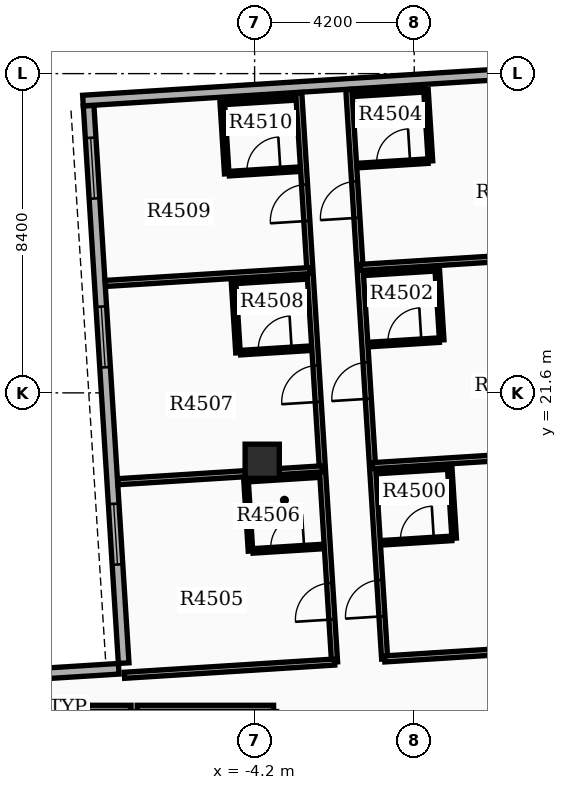
"""IFC4 building model, lengths in metres.
Left out: names, types, materials, properties, quantities, classifications, styles, units other than length and angle.
Written with IfcOpenShell. Run it as: python <this file> out.ifc"""

import sys

from ifc_helpers import new_model, si_unit, direction, frame, frame_2d, origin, origin_2d, place, context, subcontext, project, spatial, rectangle, circle, extrude, element, fill, save


model = new_model("IFC4")
c1 = context("Model", 3, precision=1e-05, world=origin(), true_north=direction((0.0, 1.0)))
c2 = subcontext(c1, "Body", "Model", "MODEL_VIEW")
j1 = project(units=[si_unit("LENGTHUNIT", "METRE"), si_unit("PLANEANGLEUNIT", "RADIAN")], contexts=[c1])
p1 = place(None, origin())
s1 = spatial("IfcSite", under=j1, at=p1, CompositionType="ELEMENT")
p2 = place(p1, origin())
s2 = spatial("IfcBuilding", under=s1, at=p2, CompositionType="ELEMENT")
p3 = place(p2, frame((0.0, 0.0, 281.1)))
s3 = spatial("IfcBuildingStorey", under=s2, at=p3, CompositionType="ELEMENT", Elevation=281.1)
p4 = place(p3, frame((-4.0, 19.8, 0.0), z_axis=(0.0, 0.0, 1.0), x_axis=(1.0, 0.0, 0.0)))
e1 = element("IfcColumn", 1, at=p4, inside=s3, PredefinedType="COLUMN", context=c2, shape_type="SweptSolid", body=[
    extrude(circle(Radius=0.45, at=origin_2d()), origin(), (0.0, 0.0, 1.0), 3.9),
])
p5 = place(p3, frame((-8.568, 29.16, 0.0), z_axis=(0.0, 0.0, 1.0), x_axis=(0.062794967833, -0.998026448555, 0.0)))
e2 = element("IfcWall", 2, at=p5, inside=s3, PredefinedType="STANDARD", context=c2, shape_type="SweptSolid", body=[
    extrude(rectangle(XDim=14.7, YDim=0.28, at=frame_2d((7.35, 0.0))), origin(), (0.0, 0.0, 1.0), 3.18),
])
p6 = place(p5, frame((0.85, 0.0, 0.8)))
e3 = element("IfcOpeningElement", 3, at=p6, cuts=e2, PredefinedType="OPENING", context=c2, shape_type="SweptSolid", body=[
    extrude(rectangle(XDim=1.6, YDim=1.7, at=frame_2d((0.8, 0.85))), frame((0.0, 0.15, 0.0), z_axis=(0.0, -1.0, 0.0), x_axis=(1.0, 0.0, 0.0)), (0.0, 0.0, 1.0), 0.3),
])
p7 = place(p5, frame((5.3, 0.0, 0.8)))
e4 = element("IfcOpeningElement", 4, at=p7, cuts=e2, PredefinedType="OPENING", context=c2, shape_type="SweptSolid", body=[
    extrude(rectangle(XDim=1.6, YDim=1.7, at=frame_2d((0.8, 0.85))), frame((0.0, 0.15, 0.0), z_axis=(0.0, -1.0, 0.0), x_axis=(1.0, 0.0, 0.0)), (0.0, 0.0, 1.0), 0.3),
])
p8 = place(p5, frame((10.5, 0.0, 0.8)))
e5 = element("IfcOpeningElement", 5, at=p8, cuts=e2, PredefinedType="OPENING", context=c2, shape_type="SweptSolid", body=[
    extrude(rectangle(XDim=1.6, YDim=1.7, at=frame_2d((0.8, 0.85))), frame((0.0, 0.15, 0.0), z_axis=(0.0, -1.0, 0.0), x_axis=(1.0, 0.0, 0.0)), (0.0, 0.0, 1.0), 0.3),
])
p9 = place(p3, frame((4.977, 30.152, 0.0), z_axis=(0.0, 0.0, 1.0), x_axis=(-0.998026318072, -0.062797041623, 0.0)))
e6 = element("IfcWall", 6, at=p9, inside=s3, PredefinedType="STANDARD", context=c2, shape_type="SweptSolid", body=[
    extrude(rectangle(XDim=13.72, YDim=0.28, at=frame_2d((6.86, 0.0))), origin(), (0.0, 0.0, 1.0), 3.18),
])
p10 = place(p9, frame((0.85, 0.0, 0.85)))
e7 = element("IfcOpeningElement", 7, at=p10, cuts=e6, PredefinedType="OPENING", context=c2, shape_type="SweptSolid", body=[
    extrude(rectangle(XDim=1.0, YDim=1.5, at=frame_2d((0.5, 0.75))), frame((0.0, 0.15, 0.0), z_axis=(0.0, -1.0, 0.0), x_axis=(1.0, 0.0, 0.0)), (0.0, 0.0, 1.0), 0.3),
])
p11 = place(p3, frame((-14.063, 13.945, 0.0), z_axis=(0.0, 0.0, 1.0), x_axis=(0.998027314704, 0.062781200242, 0.0)))
e8 = element("IfcWall", 8, at=p11, inside=s3, PredefinedType="STANDARD", context=c2, shape_type="SweptSolid", body=[
    extrude(rectangle(XDim=6.3, YDim=0.28, at=frame_2d((3.15, 0.0))), origin(), (0.0, 0.0, 1.0), 3.18),
])
p12 = place(p3, frame((-11.0, 13.3, 0.0), z_axis=(0.0, 0.0, 1.0), x_axis=(1.0, 0.0, 0.0)))
e9 = element("IfcWall", 9, at=p12, inside=s3, PredefinedType="PARTITIONING", context=c2, shape_type="SweptSolid", body=[
    extrude(rectangle(XDim=3.55, YDim=0.16, at=frame_2d((1.775, 0.0))), origin(), (0.0, 0.0, 1.0), 3.17),
])
p13 = place(p3, frame((-7.29, 13.3, 0.0), z_axis=(0.0, 0.0, 1.0), x_axis=(1.0, 0.0, 0.0)))
e10 = element("IfcWall", 10, at=p13, inside=s3, PredefinedType="PARTITIONING", context=c2, shape_type="SweptSolid", body=[
    extrude(rectangle(XDim=3.59, YDim=0.16, at=frame_2d((1.795, 0.0))), origin(), (0.0, 0.0, 1.0), 3.17),
])
p14 = place(p3, frame((-0.778, 14.6, 0.0), z_axis=(0.0, 0.0, 1.0), x_axis=(-0.062791373209, 0.998026674719, 0.0)))
e11 = element("IfcWall", 11, at=p14, inside=s3, PredefinedType="PARTITIONING", context=c2, shape_type="SweptSolid", body=[
    extrude(rectangle(XDim=15.012, YDim=0.16, at=frame_2d((7.506, 0.0))), origin(), (0.0, 0.0, 1.0), 3.17),
])
p15 = place(p14, frame((1.122, 0.0, 0.0)))
e12 = element("IfcOpeningElement", 12, at=p15, cuts=e11, PredefinedType="OPENING", context=c2, shape_type="SweptSolid", body=[
    extrude(rectangle(XDim=0.96, YDim=2.15, at=frame_2d((0.48, 1.075))), frame((0.0, 0.09, 0.0), z_axis=(0.0, -1.0, 0.0), x_axis=(1.0, 0.0, 0.0)), (0.0, 0.0, 1.0), 0.18),
])
p16 = place(p14, frame((6.858, 0.0, 0.0)))
e13 = element("IfcOpeningElement", 13, at=p16, cuts=e11, PredefinedType="OPENING", context=c2, shape_type="SweptSolid", body=[
    extrude(rectangle(XDim=0.96, YDim=2.15, at=frame_2d((0.48, 1.075))), frame((0.0, 0.09, 0.0), z_axis=(0.0, -1.0, 0.0), x_axis=(1.0, 0.0, 0.0)), (0.0, 0.0, 1.0), 0.18),
])
p17 = place(p14, frame((11.628, 0.0, 0.0)))
e14 = element("IfcOpeningElement", 14, at=p17, cuts=e11, PredefinedType="OPENING", context=c2, shape_type="SweptSolid", body=[
    extrude(rectangle(XDim=0.96, YDim=2.15, at=frame_2d((0.48, 1.075))), frame((0.0, 0.09, 0.0), z_axis=(0.0, -1.0, 0.0), x_axis=(1.0, 0.0, 0.0)), (0.0, 0.0, 1.0), 0.18),
])
p18 = place(p3, frame((-0.778, 14.6, 0.0), z_axis=(0.0, 0.0, 1.0), x_axis=(0.998025197366, 0.062814850334, 0.0)))
e15 = element("IfcWall", 15, at=p18, inside=s3, PredefinedType="PARTITIONING", context=c2, shape_type="SweptSolid", body=[
    extrude(rectangle(XDim=6.58, YDim=0.16, at=frame_2d((3.29, 0.0))), origin(), (0.0, 0.0, 1.0), 3.17),
])
p19 = place(p3, frame((-1.098, 19.684, 0.0), z_axis=(0.0, 0.0, 1.0), x_axis=(0.998024861541, 0.062820185823, 0.0)))
e16 = element("IfcWall", 16, at=p19, inside=s3, PredefinedType="PARTITIONING", context=c2, shape_type="SweptSolid", body=[
    extrude(rectangle(XDim=6.432, YDim=0.16, at=frame_2d((3.216, 0.0))), origin(), (0.0, 0.0, 1.0), 3.17),
])
p20 = place(p3, frame((-0.83, 17.657, 0.0), z_axis=(0.0, 0.0, 1.0), x_axis=(0.998027443946, 0.062779145668, 0.0)))
e17 = element("IfcWall", 17, at=p20, inside=s3, PredefinedType="PARTITIONING", context=c2, shape_type="SweptSolid", body=[
    extrude(rectangle(XDim=1.82, YDim=0.12, at=frame_2d((0.91, 0.0))), origin(), (0.0, 0.0, 1.0), 3.17),
])
p21 = place(p20, frame((0.47, 0.0, 0.0)))
e18 = element("IfcOpeningElement", 18, at=p21, cuts=e17, PredefinedType="OPENING", context=c2, shape_type="SweptSolid", body=[
    extrude(rectangle(XDim=0.88, YDim=2.1, at=frame_2d((0.44, 1.05))), frame((0.0, 0.07, 0.0), z_axis=(0.0, -1.0, 0.0), x_axis=(1.0, 0.0, 0.0)), (0.0, 0.0, 1.0), 0.14),
])
p22 = place(p3, frame((-0.948, 19.533, 0.0), z_axis=(0.0, 0.0, 1.0), x_axis=(0.998027972529, 0.062770741989, 0.0)))
e19 = element("IfcWall", 19, at=p22, inside=s3, PredefinedType="PARTITIONING", context=c2, shape_type="SweptSolid", body=[
    extrude(rectangle(XDim=1.82, YDim=0.12, at=frame_2d((0.91, 0.0))), origin(), (0.0, 0.0, 1.0), 3.17),
])
p23 = place(p3, frame((1.051, 17.775, 0.0), z_axis=(0.0, 0.0, 1.0), x_axis=(-0.062855297722, 0.998022650819, 0.0)))
e20 = element("IfcWall", 20, at=p23, inside=s3, PredefinedType="PARTITIONING", context=c2, shape_type="SweptSolid", body=[
    extrude(rectangle(XDim=1.88, YDim=0.12, at=frame_2d((0.94, 0.0))), origin(), (0.0, 0.0, 1.0), 3.17),
])
p24 = place(p3, frame((-1.426, 24.901, 0.0), z_axis=(0.0, 0.0, 1.0), x_axis=(0.998027240637, 0.062782377668, 0.0)))
e21 = element("IfcWall", 21, at=p24, inside=s3, PredefinedType="PARTITIONING", context=c2, shape_type="SweptSolid", body=[
    extrude(rectangle(XDim=6.432, YDim=0.16, at=frame_2d((3.216, 0.0))), origin(), (0.0, 0.0, 1.0), 3.17),
])
p25 = place(p3, frame((-1.158, 22.873, 0.0), z_axis=(0.0, 0.0, 1.0), x_axis=(0.998019030272, 0.062912758763, 0.0)))
e22 = element("IfcWall", 22, at=p25, inside=s3, PredefinedType="PARTITIONING", context=c2, shape_type="SweptSolid", body=[
    extrude(rectangle(XDim=1.82, YDim=0.12, at=frame_2d((0.91, 0.0))), origin(), (0.0, 0.0, 1.0), 3.17),
])
p26 = place(p25, frame((0.47, 0.0, 0.0)))
e23 = element("IfcOpeningElement", 23, at=p26, cuts=e22, PredefinedType="OPENING", context=c2, shape_type="SweptSolid", body=[
    extrude(rectangle(XDim=0.88, YDim=2.1, at=frame_2d((0.44, 1.05))), frame((0.0, 0.07, 0.0), z_axis=(0.0, -1.0, 0.0), x_axis=(1.0, 0.0, 0.0)), (0.0, 0.0, 1.0), 0.14),
])
p27 = place(p3, frame((-1.277, 24.75, 0.0), z_axis=(0.0, 0.0, 1.0), x_axis=(0.998027443946, 0.062779145668, 0.0)))
e24 = element("IfcWall", 24, at=p27, inside=s3, PredefinedType="PARTITIONING", context=c2, shape_type="SweptSolid", body=[
    extrude(rectangle(XDim=1.82, YDim=0.12, at=frame_2d((0.91, 0.0))), origin(), (0.0, 0.0, 1.0), 3.17),
])
p28 = place(p3, frame((0.723, 22.992, 0.0), z_axis=(0.0, 0.0, 1.0), x_axis=(-0.062855297722, 0.998022650819, 0.0)))
e25 = element("IfcWall", 25, at=p28, inside=s3, PredefinedType="PARTITIONING", context=c2, shape_type="SweptSolid", body=[
    extrude(rectangle(XDim=1.88, YDim=0.12, at=frame_2d((0.94, 0.0))), origin(), (0.0, 0.0, 1.0), 3.17),
])
p29 = place(p3, frame((-1.455, 27.583, 0.0), z_axis=(0.0, 0.0, 1.0), x_axis=(0.998019030272, 0.062912758763, 0.0)))
e26 = element("IfcWall", 26, at=p29, inside=s3, PredefinedType="PARTITIONING", context=c2, shape_type="SweptSolid", body=[
    extrude(rectangle(XDim=1.82, YDim=0.12, at=frame_2d((0.91, 0.0))), origin(), (0.0, 0.0, 1.0), 3.17),
])
p30 = place(p29, frame((0.47, 0.0, 0.0)))
e27 = element("IfcOpeningElement", 27, at=p30, cuts=e26, PredefinedType="OPENING", context=c2, shape_type="SweptSolid", body=[
    extrude(rectangle(XDim=0.88, YDim=2.1, at=frame_2d((0.44, 1.05))), frame((0.0, 0.07, 0.0), z_axis=(0.0, -1.0, 0.0), x_axis=(1.0, 0.0, 0.0)), (0.0, 0.0, 1.0), 0.14),
])
p31 = place(p3, frame((-1.573, 29.459, 0.0), z_axis=(0.0, 0.0, 1.0), x_axis=(0.998035839873, 0.062645529196, 0.0)))
e28 = element("IfcWall", 28, at=p31, inside=s3, PredefinedType="PARTITIONING", context=c2, shape_type="SweptSolid", body=[
    extrude(rectangle(XDim=1.82, YDim=0.12, at=frame_2d((0.91, 0.0))), origin(), (0.0, 0.0, 1.0), 3.17),
])
p32 = place(p3, frame((0.427, 27.701, 0.0), z_axis=(0.0, 0.0, 1.0), x_axis=(-0.062855297722, 0.998022650819, 0.0)))
e29 = element("IfcWall", 29, at=p32, inside=s3, PredefinedType="PARTITIONING", context=c2, shape_type="SweptSolid", body=[
    extrude(rectangle(XDim=1.88, YDim=0.12, at=frame_2d((0.94, 0.0))), origin(), (0.0, 0.0, 1.0), 3.17),
])
p33 = place(p3, frame((-2.096, 14.517, 0.0), z_axis=(0.0, 0.0, 1.0), x_axis=(-0.062791373209, 0.998026674719, 0.0)))
e30 = element("IfcWall", 30, at=p33, inside=s3, PredefinedType="PARTITIONING", context=c2, shape_type="SweptSolid", body=[
    extrude(rectangle(XDim=15.012, YDim=0.16, at=frame_2d((7.506, 0.0))), origin(), (0.0, 0.0, 1.0), 3.17),
])
p34 = place(p33, frame((1.122, 0.0, 0.0)))
e31 = element("IfcOpeningElement", 31, at=p34, cuts=e30, PredefinedType="OPENING", context=c2, shape_type="SweptSolid", body=[
    extrude(rectangle(XDim=0.96, YDim=2.15, at=frame_2d((0.48, 1.075))), frame((0.0, 0.09, 0.0), z_axis=(0.0, -1.0, 0.0), x_axis=(1.0, 0.0, 0.0)), (0.0, 0.0, 1.0), 0.18),
])
p35 = place(p33, frame((6.858, 0.0, 0.0)))
e32 = element("IfcOpeningElement", 32, at=p35, cuts=e30, PredefinedType="OPENING", context=c2, shape_type="SweptSolid", body=[
    extrude(rectangle(XDim=0.96, YDim=2.15, at=frame_2d((0.48, 1.075))), frame((0.0, 0.09, 0.0), z_axis=(0.0, -1.0, 0.0), x_axis=(1.0, 0.0, 0.0)), (0.0, 0.0, 1.0), 0.18),
])
p36 = place(p33, frame((11.628, 0.0, 0.0)))
e33 = element("IfcOpeningElement", 33, at=p36, cuts=e30, PredefinedType="OPENING", context=c2, shape_type="SweptSolid", body=[
    extrude(rectangle(XDim=0.96, YDim=2.15, at=frame_2d((0.48, 1.075))), frame((0.0, 0.09, 0.0), z_axis=(0.0, -1.0, 0.0), x_axis=(1.0, 0.0, 0.0)), (0.0, 0.0, 1.0), 0.18),
])
p37 = place(p3, frame((-2.096, 14.517, 0.0), z_axis=(0.0, 0.0, 1.0), x_axis=(-0.998026254693, -0.062798048878, 0.0)))
e34 = element("IfcWall", 34, at=p37, inside=s3, PredefinedType="PARTITIONING", context=c2, shape_type="SweptSolid", body=[
    extrude(rectangle(XDim=5.54, YDim=0.16, at=frame_2d((2.77, 0.0))), origin(), (0.0, 0.0, 1.0), 3.17),
])
p38 = place(p3, frame((-2.416, 19.601, 0.0), z_axis=(0.0, 0.0, 1.0), x_axis=(-0.998026061844, -0.062801113682, 0.0)))
e35 = element("IfcWall", 35, at=p38, inside=s3, PredefinedType="PARTITIONING", context=c2, shape_type="SweptSolid", body=[
    extrude(rectangle(XDim=5.392, YDim=0.16, at=frame_2d((2.696, 0.0))), origin(), (0.0, 0.0, 1.0), 3.17),
])
p39 = place(p3, frame((-4.244, 17.442, 0.0), z_axis=(0.0, 0.0, 1.0), x_axis=(0.998027443946, 0.062779145668, 0.0)))
e36 = element("IfcWall", 36, at=p39, inside=s3, PredefinedType="PARTITIONING", context=c2, shape_type="SweptSolid", body=[
    extrude(rectangle(XDim=1.82, YDim=0.12, at=frame_2d((0.91, 0.0))), origin(), (0.0, 0.0, 1.0), 3.17),
])
p40 = place(p39, frame((0.47, 0.0, 0.0)))
e37 = element("IfcOpeningElement", 37, at=p40, cuts=e36, PredefinedType="OPENING", context=c2, shape_type="SweptSolid", body=[
    extrude(rectangle(XDim=0.88, YDim=2.1, at=frame_2d((0.44, 1.05))), frame((0.0, 0.07, 0.0), z_axis=(0.0, -1.0, 0.0), x_axis=(1.0, 0.0, 0.0)), (0.0, 0.0, 1.0), 0.14),
])
p41 = place(p3, frame((-4.362, 19.318, 0.0), z_axis=(0.0, 0.0, 1.0), x_axis=(0.998027443946, 0.062779145668, 0.0)))
e38 = element("IfcWall", 38, at=p41, inside=s3, PredefinedType="PARTITIONING", context=c2, shape_type="SweptSolid", body=[
    extrude(rectangle(XDim=1.82, YDim=0.12, at=frame_2d((0.91, 0.0))), origin(), (0.0, 0.0, 1.0), 3.17),
])
p42 = place(p3, frame((-4.308, 17.438, 0.0), z_axis=(0.0, 0.0, 1.0), x_axis=(-0.062855297722, 0.998022650819, 0.0)))
e39 = element("IfcWall", 39, at=p42, inside=s3, PredefinedType="PARTITIONING", context=c2, shape_type="SweptSolid", body=[
    extrude(rectangle(XDim=1.88, YDim=0.12, at=frame_2d((0.94, 0.0))), origin(), (0.0, 0.0, 1.0), 3.17),
])
p43 = place(p3, frame((-2.744, 24.818, 0.0), z_axis=(0.0, 0.0, 1.0), x_axis=(-0.998026061844, -0.062801113682, 0.0)))
e40 = element("IfcWall", 40, at=p43, inside=s3, PredefinedType="PARTITIONING", context=c2, shape_type="SweptSolid", body=[
    extrude(rectangle(XDim=5.392, YDim=0.16, at=frame_2d((2.696, 0.0))), origin(), (0.0, 0.0, 1.0), 3.17),
])
p44 = place(p3, frame((-4.572, 22.659, 0.0), z_axis=(0.0, 0.0, 1.0), x_axis=(0.998027443946, 0.062779145668, 0.0)))
e41 = element("IfcWall", 41, at=p44, inside=s3, PredefinedType="PARTITIONING", context=c2, shape_type="SweptSolid", body=[
    extrude(rectangle(XDim=1.82, YDim=0.12, at=frame_2d((0.91, 0.0))), origin(), (0.0, 0.0, 1.0), 3.17),
])
p45 = place(p44, frame((0.47, 0.0, 0.0)))
e42 = element("IfcOpeningElement", 42, at=p45, cuts=e41, PredefinedType="OPENING", context=c2, shape_type="SweptSolid", body=[
    extrude(rectangle(XDim=0.88, YDim=2.1, at=frame_2d((0.44, 1.05))), frame((0.0, 0.07, 0.0), z_axis=(0.0, -1.0, 0.0), x_axis=(1.0, 0.0, 0.0)), (0.0, 0.0, 1.0), 0.14),
])
p46 = place(p3, frame((-4.69, 24.535, 0.0), z_axis=(0.0, 0.0, 1.0), x_axis=(0.998027443946, 0.062779145668, 0.0)))
e43 = element("IfcWall", 43, at=p46, inside=s3, PredefinedType="PARTITIONING", context=c2, shape_type="SweptSolid", body=[
    extrude(rectangle(XDim=1.82, YDim=0.12, at=frame_2d((0.91, 0.0))), origin(), (0.0, 0.0, 1.0), 3.17),
])
p47 = place(p3, frame((-4.637, 22.655, 0.0), z_axis=(0.0, 0.0, 1.0), x_axis=(-0.062717813936, 0.998031300018, 0.0)))
e44 = element("IfcWall", 44, at=p47, inside=s3, PredefinedType="PARTITIONING", context=c2, shape_type="SweptSolid", body=[
    extrude(rectangle(XDim=1.88, YDim=0.12, at=frame_2d((0.94, 0.0))), origin(), (0.0, 0.0, 1.0), 3.17),
])
p48 = place(p3, frame((-4.868, 27.368, 0.0), z_axis=(0.0, 0.0, 1.0), x_axis=(0.998027443946, 0.062779145668, 0.0)))
e45 = element("IfcWall", 45, at=p48, inside=s3, PredefinedType="PARTITIONING", context=c2, shape_type="SweptSolid", body=[
    extrude(rectangle(XDim=1.82, YDim=0.12, at=frame_2d((0.91, 0.0))), origin(), (0.0, 0.0, 1.0), 3.17),
])
p49 = place(p48, frame((0.47, 0.0, 0.0)))
e46 = element("IfcOpeningElement", 46, at=p49, cuts=e45, PredefinedType="OPENING", context=c2, shape_type="SweptSolid", body=[
    extrude(rectangle(XDim=0.88, YDim=2.1, at=frame_2d((0.44, 1.05))), frame((0.0, 0.07, 0.0), z_axis=(0.0, -1.0, 0.0), x_axis=(1.0, 0.0, 0.0)), (0.0, 0.0, 1.0), 0.14),
])
p50 = place(p3, frame((-4.986, 29.245, 0.0), z_axis=(0.0, 0.0, 1.0), x_axis=(0.998027443946, 0.062779145668, 0.0)))
e47 = element("IfcWall", 47, at=p50, inside=s3, PredefinedType="PARTITIONING", context=c2, shape_type="SweptSolid", body=[
    extrude(rectangle(XDim=1.82, YDim=0.12, at=frame_2d((0.91, 0.0))), origin(), (0.0, 0.0, 1.0), 3.17),
])
p51 = place(p3, frame((-4.933, 27.364, 0.0), z_axis=(0.0, 0.0, 1.0), x_axis=(-0.062855297722, 0.998022650819, 0.0)))
e48 = element("IfcWall", 48, at=p51, inside=s3, PredefinedType="PARTITIONING", context=c2, shape_type="SweptSolid", body=[
    extrude(rectangle(XDim=1.88, YDim=0.12, at=frame_2d((0.94, 0.0))), origin(), (0.0, 0.0, 1.0), 3.17),
])
p52 = place(p6, origin())
e49 = element("IfcWindow", 49, at=p52, inside=s3, PartitioningType="SINGLE_PANEL", PredefinedType="WINDOW", context=c2, shape_type="SweptSolid", body=[
    extrude(rectangle(XDim=1.6, YDim=1.7, at=frame_2d((0.8, 0.85))), frame((0.0, 0.03, 0.0), z_axis=(0.0, -1.0, 0.0), x_axis=(1.0, 0.0, 0.0)), (0.0, 0.0, 1.0), 0.06),
])
fill(e3, e49)
p53 = place(p7, origin())
e50 = element("IfcWindow", 50, at=p53, inside=s3, PartitioningType="SINGLE_PANEL", PredefinedType="WINDOW", context=c2, shape_type="SweptSolid", body=[
    extrude(rectangle(XDim=1.6, YDim=1.7, at=frame_2d((0.8, 0.85))), frame((0.0, 0.03, 0.0), z_axis=(0.0, -1.0, 0.0), x_axis=(1.0, 0.0, 0.0)), (0.0, 0.0, 1.0), 0.06),
])
fill(e4, e50)
p54 = place(p8, origin())
e51 = element("IfcWindow", 51, at=p54, inside=s3, PartitioningType="SINGLE_PANEL", PredefinedType="WINDOW", context=c2, shape_type="SweptSolid", body=[
    extrude(rectangle(XDim=1.6, YDim=1.7, at=frame_2d((0.8, 0.85))), frame((0.0, 0.03, 0.0), z_axis=(0.0, -1.0, 0.0), x_axis=(1.0, 0.0, 0.0)), (0.0, 0.0, 1.0), 0.06),
])
fill(e5, e51)
p55 = place(p15, origin())
e52 = element("IfcDoor", 52, at=p55, inside=s3, OperationType="SINGLE_SWING_LEFT", PredefinedType="DOOR", context=c2, shape_type="SweptSolid", body=[
    extrude(rectangle(XDim=0.96, YDim=2.15, at=frame_2d((0.48, 1.075))), frame((0.0, 0.025, 0.0), z_axis=(0.0, -1.0, 0.0), x_axis=(1.0, 0.0, 0.0)), (0.0, 0.0, 1.0), 0.05),
])
fill(e12, e52)
p56 = place(p21, origin())
e53 = element("IfcDoor", 53, at=p56, inside=s3, OperationType="SINGLE_SWING_RIGHT", PredefinedType="DOOR", context=c2, shape_type="SweptSolid", body=[
    extrude(rectangle(XDim=0.88, YDim=2.1, at=frame_2d((0.44, 1.05))), frame((0.0, 0.025, 0.0), z_axis=(0.0, -1.0, 0.0), x_axis=(1.0, 0.0, 0.0)), (0.0, 0.0, 1.0), 0.05),
])
fill(e18, e53)
p57 = place(p16, origin())
e54 = element("IfcDoor", 54, at=p57, inside=s3, OperationType="SINGLE_SWING_LEFT", PredefinedType="DOOR", context=c2, shape_type="SweptSolid", body=[
    extrude(rectangle(XDim=0.96, YDim=2.15, at=frame_2d((0.48, 1.075))), frame((0.0, 0.025, 0.0), z_axis=(0.0, -1.0, 0.0), x_axis=(1.0, 0.0, 0.0)), (0.0, 0.0, 1.0), 0.05),
])
fill(e13, e54)
p58 = place(p26, origin())
e55 = element("IfcDoor", 55, at=p58, inside=s3, OperationType="SINGLE_SWING_RIGHT", PredefinedType="DOOR", context=c2, shape_type="SweptSolid", body=[
    extrude(rectangle(XDim=0.88, YDim=2.1, at=frame_2d((0.44, 1.05))), frame((0.0, 0.025, 0.0), z_axis=(0.0, -1.0, 0.0), x_axis=(1.0, 0.0, 0.0)), (0.0, 0.0, 1.0), 0.05),
])
fill(e23, e55)
p59 = place(p17, origin())
e56 = element("IfcDoor", 56, at=p59, inside=s3, OperationType="SINGLE_SWING_LEFT", PredefinedType="DOOR", context=c2, shape_type="SweptSolid", body=[
    extrude(rectangle(XDim=0.96, YDim=2.15, at=frame_2d((0.48, 1.075))), frame((0.0, 0.025, 0.0), z_axis=(0.0, -1.0, 0.0), x_axis=(1.0, 0.0, 0.0)), (0.0, 0.0, 1.0), 0.05),
])
fill(e14, e56)
p60 = place(p30, origin())
e57 = element("IfcDoor", 57, at=p60, inside=s3, OperationType="SINGLE_SWING_RIGHT", PredefinedType="DOOR", context=c2, shape_type="SweptSolid", body=[
    extrude(rectangle(XDim=0.88, YDim=2.1, at=frame_2d((0.44, 1.05))), frame((0.0, 0.025, 0.0), z_axis=(0.0, -1.0, 0.0), x_axis=(1.0, 0.0, 0.0)), (0.0, 0.0, 1.0), 0.05),
])
fill(e27, e57)
p61 = place(p34, origin())
e58 = element("IfcDoor", 58, at=p61, inside=s3, OperationType="SINGLE_SWING_LEFT", PredefinedType="DOOR", context=c2, shape_type="SweptSolid", body=[
    extrude(rectangle(XDim=0.96, YDim=2.15, at=frame_2d((0.48, 1.075))), frame((0.0, 0.025, 0.0), z_axis=(0.0, -1.0, 0.0), x_axis=(1.0, 0.0, 0.0)), (0.0, 0.0, 1.0), 0.05),
])
fill(e31, e58)
p62 = place(p40, origin())
e59 = element("IfcDoor", 59, at=p62, inside=s3, OperationType="SINGLE_SWING_RIGHT", PredefinedType="DOOR", context=c2, shape_type="SweptSolid", body=[
    extrude(rectangle(XDim=0.88, YDim=2.1, at=frame_2d((0.44, 1.05))), frame((0.0, 0.025, 0.0), z_axis=(0.0, -1.0, 0.0), x_axis=(1.0, 0.0, 0.0)), (0.0, 0.0, 1.0), 0.05),
])
fill(e37, e59)
p63 = place(p35, origin())
e60 = element("IfcDoor", 60, at=p63, inside=s3, OperationType="SINGLE_SWING_LEFT", PredefinedType="DOOR", context=c2, shape_type="SweptSolid", body=[
    extrude(rectangle(XDim=0.96, YDim=2.15, at=frame_2d((0.48, 1.075))), frame((0.0, 0.025, 0.0), z_axis=(0.0, -1.0, 0.0), x_axis=(1.0, 0.0, 0.0)), (0.0, 0.0, 1.0), 0.05),
])
fill(e32, e60)
p64 = place(p45, origin())
e61 = element("IfcDoor", 61, at=p64, inside=s3, OperationType="SINGLE_SWING_RIGHT", PredefinedType="DOOR", context=c2, shape_type="SweptSolid", body=[
    extrude(rectangle(XDim=0.88, YDim=2.1, at=frame_2d((0.44, 1.05))), frame((0.0, 0.025, 0.0), z_axis=(0.0, -1.0, 0.0), x_axis=(1.0, 0.0, 0.0)), (0.0, 0.0, 1.0), 0.05),
])
fill(e42, e61)
p65 = place(p36, origin())
e62 = element("IfcDoor", 62, at=p65, inside=s3, OperationType="SINGLE_SWING_LEFT", PredefinedType="DOOR", context=c2, shape_type="SweptSolid", body=[
    extrude(rectangle(XDim=0.96, YDim=2.15, at=frame_2d((0.48, 1.075))), frame((0.0, 0.025, 0.0), z_axis=(0.0, -1.0, 0.0), x_axis=(1.0, 0.0, 0.0)), (0.0, 0.0, 1.0), 0.05),
])
fill(e33, e62)
p66 = place(p49, origin())
e63 = element("IfcDoor", 63, at=p66, inside=s3, OperationType="SINGLE_SWING_RIGHT", PredefinedType="DOOR", context=c2, shape_type="SweptSolid", body=[
    extrude(rectangle(XDim=0.88, YDim=2.1, at=frame_2d((0.44, 1.05))), frame((0.0, 0.025, 0.0), z_axis=(0.0, -1.0, 0.0), x_axis=(1.0, 0.0, 0.0)), (0.0, 0.0, 1.0), 0.05),
])
fill(e46, e63)
save(model, sys.argv[1])
